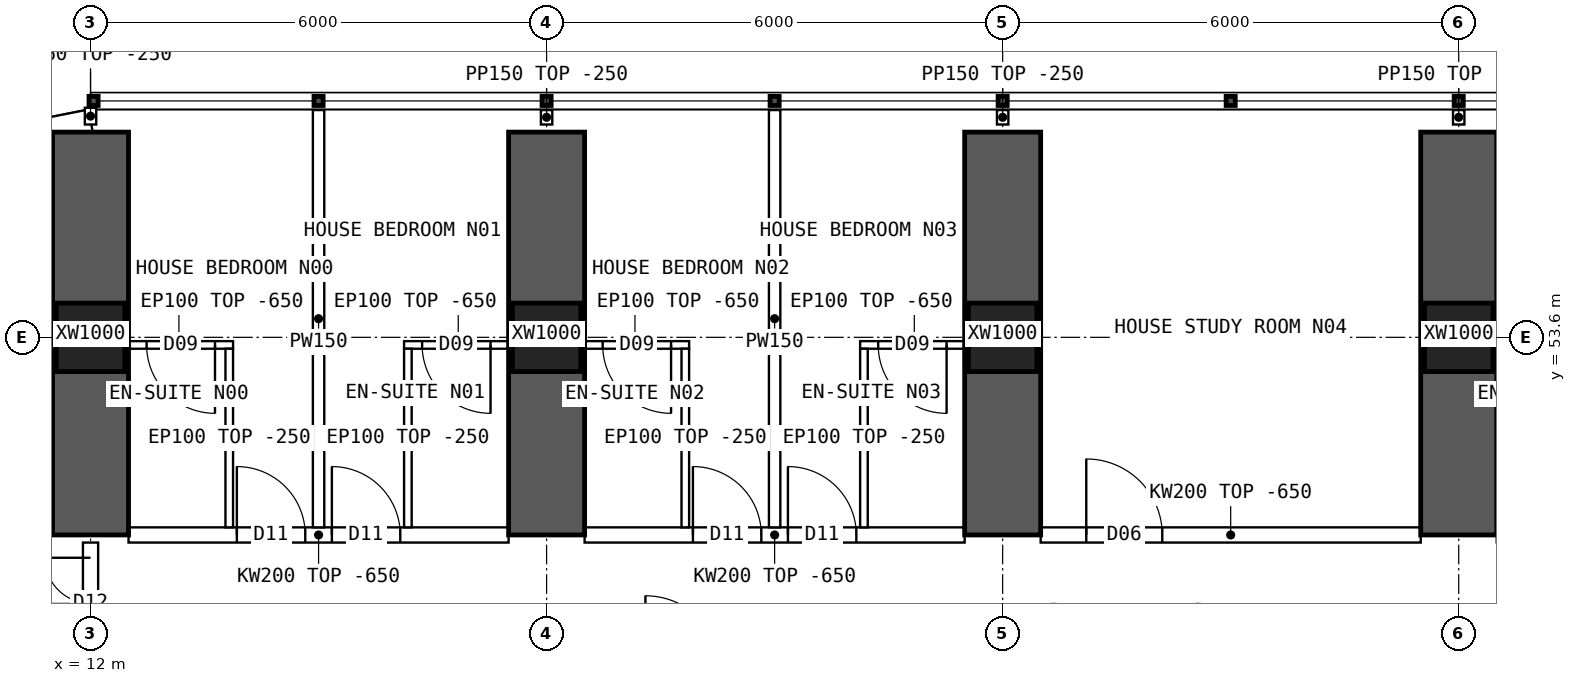
"""IFC4 building model, lengths in metres.
Left out: names, types, materials, properties, quantities, classifications, styles, units other than length and angle.
Written with IfcOpenShell. Run it as: python <this file> out.ifc"""

import sys

from ifc_helpers import new_model, si_unit, direction, frame, frame_2d, origin, origin_2d, place, context, subcontext, project, spatial, polyline, rectangle, hollow_rectangle, outline, extrude, element, fill, save


model = new_model("IFC4")
c1 = context("Model", 3, precision=1e-05, world=origin(), true_north=direction((0.0, 1.0)))
c2 = subcontext(c1, "Body", "Model", "MODEL_VIEW")
j1 = project(units=[si_unit("LENGTHUNIT", "METRE"), si_unit("PLANEANGLEUNIT", "RADIAN")], contexts=[c1])
p1 = place(None, origin())
s1 = spatial("IfcSite", under=j1, at=p1, CompositionType="ELEMENT")
p2 = place(p1, origin())
s2 = spatial("IfcBuilding", under=s1, at=p2, CompositionType="ELEMENT")
p3 = place(p2, frame((0.0, 0.0, 23.95)))
s3 = spatial("IfcBuildingStorey", under=s2, at=p3, CompositionType="ELEMENT", Elevation=23.95)
for number, where, z_axis, x_axis in (
    (1, (12.0, 53.6, 0.0), (0.0, 0.0, 1.0), (1.0, 0.0, 0.0)),
    (2, (18.0, 53.6, 0.0), (0.0, 0.0, 1.0), (1.0, 0.0, 0.0)),
    (3, (24.0, 53.6, 0.0), (0.0, 0.0, 1.0), (1.0, 0.0, 0.0)),
    (4, (30.0, 53.6, 0.0), (0.0, 0.0, 1.0), (1.0, 0.0, 0.0)),
):
    element("IfcColumn", number, at=place(p3, frame(where, z_axis=z_axis, x_axis=x_axis)), inside=s3, PredefinedType="COLUMN", context=c2, shape_type="SweptSolid", body=[
        extrude(hollow_rectangle(XDim=0.9, YDim=0.9, WallThickness=0.09, at=origin_2d()), origin(), (0.0, 0.0, 1.0), 3.75),
    ])
for number, where, z_axis, x_axis in (
    (5, (12.0, 51.0, 0.0), (0.0, 0.0, 1.0), (0.0, 1.0, 0.0)),
    (6, (18.0, 51.0, 0.0), (0.0, 0.0, 1.0), (0.0, 1.0, 0.0)),
    (7, (24.0, 51.0, 0.0), (0.0, 0.0, 1.0), (0.0, 1.0, 0.0)),
    (8, (30.0, 51.0, 0.0), (0.0, 0.0, 1.0), (0.0, 1.0, 0.0)),
):
    element("IfcWall", number, at=place(p3, frame(where, z_axis=z_axis, x_axis=x_axis)), inside=s3, PredefinedType="SHEAR", context=c2, shape_type="SweptSolid", body=[
        extrude(rectangle(XDim=5.3, YDim=1.0, at=frame_2d((2.65, 0.0))), origin(), (0.0, 0.0, 1.0), 3.75),
    ])
p4 = place(p3, frame((12.0, 56.45, 0.0), z_axis=(0.0, 0.0, 1.0), x_axis=(-0.980787251524, -0.195080412259, 0.0)))
e9 = element("IfcWall", 9, at=p4, inside=s3, PredefinedType="SOLIDWALL", context=c2, shape_type="SweptSolid", body=[
    extrude(outline(polyline([(-0.03, -0.15), (3.249, -0.15), (3.189, 0.15), (0.03, 0.15), (-0.03, -0.15)])), origin(), (0.0, 0.0, 1.0), 3.5),
])
p5 = place(p4, frame((0.909, 0.0, 0.9)))
e10 = element("IfcOpeningElement", 10, at=p5, cuts=e9, PredefinedType="OPENING", context=c2, shape_type="SweptSolid", body=[
    extrude(rectangle(XDim=1.4, YDim=1.8, at=frame_2d((0.7, 0.9))), frame((0.0, 0.16, 0.0), z_axis=(0.0, -1.0, 0.0), x_axis=(1.0, 0.0, 0.0)), (0.0, 0.0, 1.0), 0.32),
])
p6 = place(p3, frame((12.5, 51.0, 0.0), z_axis=(0.0, 0.0, 1.0), x_axis=(1.0, 0.0, 0.0)))
e11 = element("IfcWall", 11, at=p6, inside=s3, PredefinedType="SOLIDWALL", context=c2, shape_type="SweptSolid", body=[
    extrude(outline(polyline([(0.0, 0.0), (5.0, 0.0), (5.0, 3.1), (0.0, 3.1), (0.0, 0.0)])), frame((0.0, 0.1, 0.0), z_axis=(0.0, -1.0, 0.0), x_axis=(1.0, 0.0, 0.0)), (0.0, 0.0, 1.0), 0.2),
])
p7 = place(p6, frame((1.425, 0.0, 0.0)))
e12 = element("IfcOpeningElement", 12, at=p7, cuts=e11, PredefinedType="OPENING", context=c2, shape_type="SweptSolid", body=[
    extrude(rectangle(XDim=0.9, YDim=2.1, at=frame_2d((0.45, 1.05))), frame((0.0, 0.11, 0.0), z_axis=(0.0, -1.0, 0.0), x_axis=(1.0, 0.0, 0.0)), (0.0, 0.0, 1.0), 0.22),
])
p8 = place(p6, frame((2.675, 0.0, 0.0)))
e13 = element("IfcOpeningElement", 13, at=p8, cuts=e11, PredefinedType="OPENING", context=c2, shape_type="SweptSolid", body=[
    extrude(rectangle(XDim=0.9, YDim=2.1, at=frame_2d((0.45, 1.05))), frame((0.0, 0.11, 0.0), z_axis=(0.0, -1.0, 0.0), x_axis=(1.0, 0.0, 0.0)), (0.0, 0.0, 1.0), 0.22),
])
p9 = place(p3, frame((18.5, 51.0, 0.0), z_axis=(0.0, 0.0, 1.0), x_axis=(1.0, 0.0, 0.0)))
e14 = element("IfcWall", 14, at=p9, inside=s3, PredefinedType="SOLIDWALL", context=c2, shape_type="SweptSolid", body=[
    extrude(outline(polyline([(0.0, 0.0), (5.0, 0.0), (5.0, 3.1), (0.0, 3.1), (0.0, 0.0)])), frame((0.0, 0.1, 0.0), z_axis=(0.0, -1.0, 0.0), x_axis=(1.0, 0.0, 0.0)), (0.0, 0.0, 1.0), 0.2),
])
p10 = place(p9, frame((1.425, 0.0, 0.0)))
e15 = element("IfcOpeningElement", 15, at=p10, cuts=e14, PredefinedType="OPENING", context=c2, shape_type="SweptSolid", body=[
    extrude(rectangle(XDim=0.9, YDim=2.1, at=frame_2d((0.45, 1.05))), frame((0.0, 0.11, 0.0), z_axis=(0.0, -1.0, 0.0), x_axis=(1.0, 0.0, 0.0)), (0.0, 0.0, 1.0), 0.22),
])
p11 = place(p9, frame((2.675, 0.0, 0.0)))
e16 = element("IfcOpeningElement", 16, at=p11, cuts=e14, PredefinedType="OPENING", context=c2, shape_type="SweptSolid", body=[
    extrude(rectangle(XDim=0.9, YDim=2.1, at=frame_2d((0.45, 1.05))), frame((0.0, 0.11, 0.0), z_axis=(0.0, -1.0, 0.0), x_axis=(1.0, 0.0, 0.0)), (0.0, 0.0, 1.0), 0.22),
])
p12 = place(p3, frame((24.5, 51.0, 0.0), z_axis=(0.0, 0.0, 1.0), x_axis=(1.0, 0.0, 0.0)))
e17 = element("IfcWall", 17, at=p12, inside=s3, PredefinedType="SOLIDWALL", context=c2, shape_type="SweptSolid", body=[
    extrude(outline(polyline([(0.0, 0.0), (5.0, 0.0), (5.0, 3.1), (0.0, 3.1), (0.0, 0.0)])), frame((0.0, 0.1, 0.0), z_axis=(0.0, -1.0, 0.0), x_axis=(1.0, 0.0, 0.0)), (0.0, 0.0, 1.0), 0.2),
])
p13 = place(p12, frame((0.6, 0.0, 0.0)))
e18 = element("IfcOpeningElement", 18, at=p13, cuts=e17, PredefinedType="OPENING", context=c2, shape_type="SweptSolid", body=[
    extrude(rectangle(XDim=1.0, YDim=2.1, at=frame_2d((0.5, 1.05))), frame((0.0, 0.11, 0.0), z_axis=(0.0, -1.0, 0.0), x_axis=(1.0, 0.0, 0.0)), (0.0, 0.0, 1.0), 0.22),
])
p14 = place(p3, frame((15.0, 56.59, 0.0), z_axis=(0.0, 0.0, 1.0), x_axis=(0.0, -1.0, 0.0)))
e19 = element("IfcWall", 19, at=p14, inside=s3, PredefinedType="PARTITIONING", context=c2, shape_type="SweptSolid", body=[
    extrude(outline(polyline([(0.0, 0.0), (5.49, 0.0), (5.49, 3.1), (5.442, 3.1), (5.44, 3.5), (3.192, 3.5), (3.19, 3.1), (2.792, 3.1), (2.79, 3.5), (0.0, 3.5), (0.0, 0.0)])), frame((0.0, 0.075, 0.0), z_axis=(0.0, -1.0, 0.0), x_axis=(1.0, 0.0, 0.0)), (0.0, 0.0, 1.0), 0.15),
])
p15 = place(p3, frame((12.45, 53.5, 0.0), z_axis=(0.0, 0.0, 1.0), x_axis=(1.0, 0.0, 0.0)))
e20 = element("IfcWall", 20, at=p15, inside=s3, PredefinedType="PARTITIONING", context=c2, shape_type="SweptSolid", body=[
    extrude(outline(polyline([(0.0, 0.0), (1.425, 0.0), (1.425, 3.1), (0.0, 3.1), (0.0, 0.0)])), frame((0.0, 0.05, 0.0), z_axis=(0.0, -1.0, 0.0), x_axis=(1.0, 0.0, 0.0)), (0.0, 0.0, 1.0), 0.1),
])
p16 = place(p15, frame((0.288, 0.0, 0.0)))
e21 = element("IfcOpeningElement", 21, at=p16, cuts=e20, PredefinedType="OPENING", context=c2, shape_type="SweptSolid", body=[
    extrude(rectangle(XDim=0.9, YDim=2.1, at=frame_2d((0.45, 1.05))), frame((0.0, 0.06, 0.0), z_axis=(0.0, -1.0, 0.0), x_axis=(1.0, 0.0, 0.0)), (0.0, 0.0, 1.0), 0.12),
])
p17 = place(p3, frame((13.825, 53.45, 0.0), z_axis=(0.0, 0.0, 1.0), x_axis=(0.0, -1.0, 0.0)))
e22 = element("IfcWall", 22, at=p17, inside=s3, PredefinedType="PARTITIONING", context=c2, shape_type="SweptSolid", body=[
    extrude(outline(polyline([(0.0, 0.0), (2.35, 0.0), (2.35, 3.1), (2.302, 3.1), (2.3, 3.5), (0.052, 3.5), (0.05, 3.1), (0.0, 3.1), (0.0, 0.0)])), frame((0.0, 0.05, 0.0), z_axis=(0.0, -1.0, 0.0), x_axis=(1.0, 0.0, 0.0)), (0.0, 0.0, 1.0), 0.1),
])
p18 = place(p3, frame((16.125, 53.5, 0.0), z_axis=(0.0, 0.0, 1.0), x_axis=(1.0, 0.0, 0.0)))
e23 = element("IfcWall", 23, at=p18, inside=s3, PredefinedType="PARTITIONING", context=c2, shape_type="SweptSolid", body=[
    extrude(outline(polyline([(0.0, 0.0), (1.425, 0.0), (1.425, 3.1), (0.0, 3.1), (0.0, 0.0)])), frame((0.0, 0.05, 0.0), z_axis=(0.0, -1.0, 0.0), x_axis=(1.0, 0.0, 0.0)), (0.0, 0.0, 1.0), 0.1),
])
p19 = place(p18, frame((0.238, 0.0, 0.0)))
e24 = element("IfcOpeningElement", 24, at=p19, cuts=e23, PredefinedType="OPENING", context=c2, shape_type="SweptSolid", body=[
    extrude(rectangle(XDim=0.9, YDim=2.1, at=frame_2d((0.45, 1.05))), frame((0.0, 0.06, 0.0), z_axis=(0.0, -1.0, 0.0), x_axis=(1.0, 0.0, 0.0)), (0.0, 0.0, 1.0), 0.12),
])
p20 = place(p3, frame((16.175, 53.45, 0.0), z_axis=(0.0, 0.0, 1.0), x_axis=(0.0, -1.0, 0.0)))
e25 = element("IfcWall", 25, at=p20, inside=s3, PredefinedType="PARTITIONING", context=c2, shape_type="SweptSolid", body=[
    extrude(outline(polyline([(0.0, 0.0), (2.35, 0.0), (2.35, 3.1), (2.302, 3.1), (2.3, 3.5), (0.052, 3.5), (0.05, 3.1), (0.0, 3.1), (0.0, 0.0)])), frame((0.0, 0.05, 0.0), z_axis=(0.0, -1.0, 0.0), x_axis=(1.0, 0.0, 0.0)), (0.0, 0.0, 1.0), 0.1),
])
p21 = place(p3, frame((21.0, 56.59, 0.0), z_axis=(0.0, 0.0, 1.0), x_axis=(0.0, -1.0, 0.0)))
e26 = element("IfcWall", 26, at=p21, inside=s3, PredefinedType="PARTITIONING", context=c2, shape_type="SweptSolid", body=[
    extrude(outline(polyline([(0.0, 0.0), (5.49, 0.0), (5.49, 3.1), (5.442, 3.1), (5.44, 3.5), (3.192, 3.5), (3.19, 3.1), (2.792, 3.1), (2.79, 3.5), (0.0, 3.5), (0.0, 0.0)])), frame((0.0, 0.075, 0.0), z_axis=(0.0, -1.0, 0.0), x_axis=(1.0, 0.0, 0.0)), (0.0, 0.0, 1.0), 0.15),
])
p22 = place(p3, frame((18.45, 53.5, 0.0), z_axis=(0.0, 0.0, 1.0), x_axis=(1.0, 0.0, 0.0)))
e27 = element("IfcWall", 27, at=p22, inside=s3, PredefinedType="PARTITIONING", context=c2, shape_type="SweptSolid", body=[
    extrude(outline(polyline([(0.0, 0.0), (1.425, 0.0), (1.425, 3.1), (0.0, 3.1), (0.0, 0.0)])), frame((0.0, 0.05, 0.0), z_axis=(0.0, -1.0, 0.0), x_axis=(1.0, 0.0, 0.0)), (0.0, 0.0, 1.0), 0.1),
])
p23 = place(p22, frame((0.288, 0.0, 0.0)))
e28 = element("IfcOpeningElement", 28, at=p23, cuts=e27, PredefinedType="OPENING", context=c2, shape_type="SweptSolid", body=[
    extrude(rectangle(XDim=0.9, YDim=2.1, at=frame_2d((0.45, 1.05))), frame((0.0, 0.06, 0.0), z_axis=(0.0, -1.0, 0.0), x_axis=(1.0, 0.0, 0.0)), (0.0, 0.0, 1.0), 0.12),
])
p24 = place(p3, frame((19.825, 53.45, 0.0), z_axis=(0.0, 0.0, 1.0), x_axis=(0.0, -1.0, 0.0)))
e29 = element("IfcWall", 29, at=p24, inside=s3, PredefinedType="PARTITIONING", context=c2, shape_type="SweptSolid", body=[
    extrude(outline(polyline([(0.0, 0.0), (2.35, 0.0), (2.35, 3.1), (2.302, 3.1), (2.3, 3.5), (0.052, 3.5), (0.05, 3.1), (0.0, 3.1), (0.0, 0.0)])), frame((0.0, 0.05, 0.0), z_axis=(0.0, -1.0, 0.0), x_axis=(1.0, 0.0, 0.0)), (0.0, 0.0, 1.0), 0.1),
])
p25 = place(p3, frame((22.125, 53.5, 0.0), z_axis=(0.0, 0.0, 1.0), x_axis=(1.0, 0.0, 0.0)))
e30 = element("IfcWall", 30, at=p25, inside=s3, PredefinedType="PARTITIONING", context=c2, shape_type="SweptSolid", body=[
    extrude(outline(polyline([(0.0, 0.0), (1.425, 0.0), (1.425, 3.1), (0.0, 3.1), (0.0, 0.0)])), frame((0.0, 0.05, 0.0), z_axis=(0.0, -1.0, 0.0), x_axis=(1.0, 0.0, 0.0)), (0.0, 0.0, 1.0), 0.1),
])
p26 = place(p25, frame((0.238, 0.0, 0.0)))
e31 = element("IfcOpeningElement", 31, at=p26, cuts=e30, PredefinedType="OPENING", context=c2, shape_type="SweptSolid", body=[
    extrude(rectangle(XDim=0.9, YDim=2.1, at=frame_2d((0.45, 1.05))), frame((0.0, 0.06, 0.0), z_axis=(0.0, -1.0, 0.0), x_axis=(1.0, 0.0, 0.0)), (0.0, 0.0, 1.0), 0.12),
])
p27 = place(p3, frame((22.175, 53.45, 0.0), z_axis=(0.0, 0.0, 1.0), x_axis=(0.0, -1.0, 0.0)))
e32 = element("IfcWall", 32, at=p27, inside=s3, PredefinedType="PARTITIONING", context=c2, shape_type="SweptSolid", body=[
    extrude(outline(polyline([(0.0, 0.0), (2.35, 0.0), (2.35, 3.1), (2.302, 3.1), (2.3, 3.5), (0.052, 3.5), (0.05, 3.1), (0.0, 3.1), (0.0, 0.0)])), frame((0.0, 0.05, 0.0), z_axis=(0.0, -1.0, 0.0), x_axis=(1.0, 0.0, 0.0)), (0.0, 0.0, 1.0), 0.1),
])
p28 = place(p3, frame((30.45, 53.5, 0.0), z_axis=(0.0, 0.0, 1.0), x_axis=(1.0, 0.0, 0.0)))
e33 = element("IfcWall", 33, at=p28, inside=s3, PredefinedType="PARTITIONING", context=c2, shape_type="SweptSolid", body=[
    extrude(outline(polyline([(0.0, 0.0), (1.425, 0.0), (1.425, 3.1), (0.0, 3.1), (0.0, 0.0)])), frame((0.0, 0.05, 0.0), z_axis=(0.0, -1.0, 0.0), x_axis=(1.0, 0.0, 0.0)), (0.0, 0.0, 1.0), 0.1),
])
p29 = place(p28, frame((0.288, 0.0, 0.0)))
e34 = element("IfcOpeningElement", 34, at=p29, cuts=e33, PredefinedType="OPENING", context=c2, shape_type="SweptSolid", body=[
    extrude(rectangle(XDim=0.9, YDim=2.1, at=frame_2d((0.45, 1.05))), frame((0.0, 0.06, 0.0), z_axis=(0.0, -1.0, 0.0), x_axis=(1.0, 0.0, 0.0)), (0.0, 0.0, 1.0), 0.12),
])
p30 = place(p3, frame((12.0, 49.3, 0.0), z_axis=(0.0, 0.0, 1.0), x_axis=(0.0, 1.0, 0.0)))
e35 = element("IfcWall", 35, at=p30, inside=s3, PredefinedType="SOLIDWALL", context=c2, shape_type="SweptSolid", body=[
    extrude(outline(polyline([(0.0, 0.0), (1.6, 0.0), (1.6, 3.05), (0.0, 3.05), (0.0, 0.0)])), frame((0.0, 0.1, 0.0), z_axis=(0.0, -1.0, 0.0), x_axis=(1.0, 0.0, 0.0)), (0.0, 0.0, 1.0), 0.2),
])
p31 = place(p30, frame((0.2, 0.0, 0.0)))
e36 = element("IfcOpeningElement", 36, at=p31, cuts=e35, PredefinedType="OPENING", context=c2, shape_type="SweptSolid", body=[
    extrude(rectangle(XDim=1.2, YDim=2.1, at=frame_2d((0.6, 1.05))), frame((0.0, 0.11, 0.0), z_axis=(0.0, -1.0, 0.0), x_axis=(1.0, 0.0, 0.0)), (0.0, 0.0, 1.0), 0.22),
])
p32 = place(p3, frame((12.0, 56.4, 0.0), z_axis=(0.0, 0.0, 1.0), x_axis=(0.0, 1.0, 0.0)))
e37 = element("IfcWall", 37, at=p32, inside=s3, PredefinedType="PARTITIONING", context=c2, shape_type="SweptSolid", body=[
    extrude(rectangle(XDim=0.22, YDim=0.15, at=frame_2d((0.11, 0.0))), origin(), (0.0, 0.0, 1.0), 3.5),
])
for number, where, z_axis, x_axis in (
    (38, (18.0, 56.4, 0.0), (0.0, 0.0, 1.0), (0.0, 1.0, 0.0)),
    (39, (24.0, 56.4, 0.0), (0.0, 0.0, 1.0), (0.0, 1.0, 0.0)),
    (40, (30.0, 56.4, 0.0), (0.0, 0.0, 1.0), (0.0, 1.0, 0.0)),
):
    element("IfcWall", number, at=place(p3, frame(where, z_axis=z_axis, x_axis=x_axis)), inside=s3, PredefinedType="PARTITIONING", context=c2, shape_type="SweptSolid", body=[
        extrude(rectangle(XDim=0.19, YDim=0.15, at=frame_2d((0.095, 0.0))), origin(), (0.0, 0.0, 1.0), 3.5),
    ])
p33 = place(p16, origin())
e41 = element("IfcDoor", 41, at=p33, inside=s3, OperationType="SINGLE_SWING_RIGHT", PredefinedType="DOOR", context=c2, shape_type="SweptSolid", body=[
    extrude(rectangle(XDim=0.9, YDim=2.1, at=frame_2d((0.45, 1.05))), frame((0.0, 0.025, 0.0), z_axis=(0.0, -1.0, 0.0), x_axis=(1.0, 0.0, 0.0)), (0.0, 0.0, 1.0), 0.05),
])
fill(e21, e41)
p34 = place(p7, origin())
e42 = element("IfcDoor", 42, at=p34, inside=s3, OperationType="SINGLE_SWING_LEFT", PredefinedType="DOOR", context=c2, shape_type="SweptSolid", body=[
    extrude(rectangle(XDim=0.9, YDim=2.1, at=frame_2d((0.45, 1.05))), frame((0.0, 0.025, 0.0), z_axis=(0.0, -1.0, 0.0), x_axis=(1.0, 0.0, 0.0)), (0.0, 0.0, 1.0), 0.05),
])
fill(e12, e42)
p35 = place(p19, origin())
e43 = element("IfcDoor", 43, at=p35, inside=s3, OperationType="SINGLE_SWING_RIGHT", PredefinedType="DOOR", context=c2, shape_type="SweptSolid", body=[
    extrude(rectangle(XDim=0.9, YDim=2.1, at=frame_2d((0.45, 1.05))), frame((0.0, 0.025, 0.0), z_axis=(0.0, -1.0, 0.0), x_axis=(1.0, 0.0, 0.0)), (0.0, 0.0, 1.0), 0.05),
])
fill(e24, e43)
p36 = place(p8, origin())
e44 = element("IfcDoor", 44, at=p36, inside=s3, OperationType="SINGLE_SWING_LEFT", PredefinedType="DOOR", context=c2, shape_type="SweptSolid", body=[
    extrude(rectangle(XDim=0.9, YDim=2.1, at=frame_2d((0.45, 1.05))), frame((0.0, 0.025, 0.0), z_axis=(0.0, -1.0, 0.0), x_axis=(1.0, 0.0, 0.0)), (0.0, 0.0, 1.0), 0.05),
])
fill(e13, e44)
p37 = place(p23, origin())
e45 = element("IfcDoor", 45, at=p37, inside=s3, OperationType="SINGLE_SWING_RIGHT", PredefinedType="DOOR", context=c2, shape_type="SweptSolid", body=[
    extrude(rectangle(XDim=0.9, YDim=2.1, at=frame_2d((0.45, 1.05))), frame((0.0, 0.025, 0.0), z_axis=(0.0, -1.0, 0.0), x_axis=(1.0, 0.0, 0.0)), (0.0, 0.0, 1.0), 0.05),
])
fill(e28, e45)
p38 = place(p10, origin())
e46 = element("IfcDoor", 46, at=p38, inside=s3, OperationType="SINGLE_SWING_LEFT", PredefinedType="DOOR", context=c2, shape_type="SweptSolid", body=[
    extrude(rectangle(XDim=0.9, YDim=2.1, at=frame_2d((0.45, 1.05))), frame((0.0, 0.025, 0.0), z_axis=(0.0, -1.0, 0.0), x_axis=(1.0, 0.0, 0.0)), (0.0, 0.0, 1.0), 0.05),
])
fill(e15, e46)
p39 = place(p26, origin())
e47 = element("IfcDoor", 47, at=p39, inside=s3, OperationType="SINGLE_SWING_RIGHT", PredefinedType="DOOR", context=c2, shape_type="SweptSolid", body=[
    extrude(rectangle(XDim=0.9, YDim=2.1, at=frame_2d((0.45, 1.05))), frame((0.0, 0.025, 0.0), z_axis=(0.0, -1.0, 0.0), x_axis=(1.0, 0.0, 0.0)), (0.0, 0.0, 1.0), 0.05),
])
fill(e31, e47)
p40 = place(p11, origin())
e48 = element("IfcDoor", 48, at=p40, inside=s3, OperationType="SINGLE_SWING_LEFT", PredefinedType="DOOR", context=c2, shape_type="SweptSolid", body=[
    extrude(rectangle(XDim=0.9, YDim=2.1, at=frame_2d((0.45, 1.05))), frame((0.0, 0.025, 0.0), z_axis=(0.0, -1.0, 0.0), x_axis=(1.0, 0.0, 0.0)), (0.0, 0.0, 1.0), 0.05),
])
fill(e16, e48)
p41 = place(p13, origin())
e49 = element("IfcDoor", 49, at=p41, inside=s3, OperationType="SINGLE_SWING_LEFT", PredefinedType="DOOR", context=c2, shape_type="SweptSolid", body=[
    extrude(rectangle(XDim=1.0, YDim=2.1, at=frame_2d((0.5, 1.05))), frame((0.0, 0.025, 0.0), z_axis=(0.0, -1.0, 0.0), x_axis=(1.0, 0.0, 0.0)), (0.0, 0.0, 1.0), 0.05),
])
fill(e18, e49)
p42 = place(p31, origin())
e50 = element("IfcDoor", 50, at=p42, inside=s3, OperationType="DOUBLE_DOOR_SINGLE_SWING", PredefinedType="DOOR", context=c2, shape_type="SweptSolid", body=[
    extrude(rectangle(XDim=1.2, YDim=2.1, at=frame_2d((0.6, 1.05))), frame((0.0, 0.025, 0.0), z_axis=(0.0, -1.0, 0.0), x_axis=(1.0, 0.0, 0.0)), (0.0, 0.0, 1.0), 0.05),
])
fill(e36, e50)
save(model, sys.argv[1])
